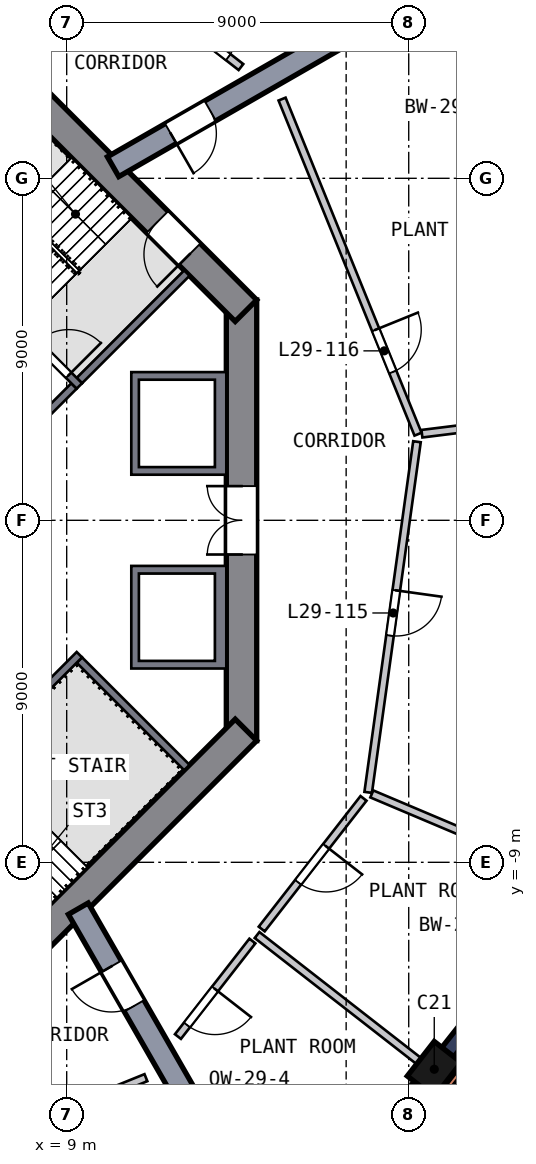
"""IFC4 building model, lengths in metres.
Left out: names, types, materials, properties, quantities, classifications, styles, units other than length and angle.
Written with IfcOpenShell. Run it as: python <this file> out.ifc"""

import sys

from ifc_helpers import new_model, si_unit, direction, frame, frame_2d, origin, origin_2d, place, context, subcontext, project, spatial, polyline, rectangle, outline, extrude, element, fill, save


model = new_model("IFC4")
c1 = context("Model", 3, precision=1e-05, world=origin(), true_north=direction((0.0, 1.0)))
c2 = subcontext(c1, "Body", "Model", "MODEL_VIEW")
j1 = project(units=[si_unit("LENGTHUNIT", "METRE"), si_unit("PLANEANGLEUNIT", "RADIAN")], contexts=[c1])
p1 = place(None, origin())
s1 = spatial("IfcSite", under=j1, at=p1, CompositionType="ELEMENT")
p2 = place(p1, origin())
s2 = spatial("IfcBuilding", under=s1, at=p2, CompositionType="ELEMENT")
p3 = place(p2, frame((0.0, 0.0, 122.0)))
s3 = spatial("IfcBuildingStorey", under=s2, at=p3, CompositionType="ELEMENT", Elevation=122.0)
p4 = place(p3, frame((18.624, -14.509, 0.0), z_axis=(0.040006427, 0.052241139, 0.997832826), x_axis=(0.613325681, 0.787084661, -0.065797763)))
e1 = element("IfcColumn", 1, at=p4, inside=s3, PredefinedType="COLUMN", context=c2, shape_type="SweptSolid", body=[
    extrude(rectangle(XDim=1.15, YDim=0.9, at=origin_2d()), origin(), (0.0, 0.0, 1.0), 4.51),
])
p5 = place(p3, frame((13.6, -5.799, 0.0), z_axis=(0.0, 0.0, 1.0), x_axis=(0.0, 1.0, 0.0)))
e2 = element("IfcWall", 2, at=p5, inside=s3, PredefinedType="SHEAR", context=c2, shape_type="SweptSolid", body=[
    extrude(rectangle(XDim=11.598, YDim=0.8, at=frame_2d((5.799, 0.0))), origin(), (0.0, 0.0, 1.0), 6.0),
])
p6 = place(p5, frame((4.899, 0.0, 0.0)))
e3 = element("IfcOpeningElement", 3, at=p6, cuts=e2, PredefinedType="OPENING", context=c2, shape_type="SweptSolid", body=[
    extrude(rectangle(XDim=1.8, YDim=2.1, at=frame_2d((0.9, 1.05))), frame((0.0, 0.41, 0.0), z_axis=(0.0, -1.0, 0.0), x_axis=(1.0, 0.0, 0.0)), (0.0, 0.0, 1.0), 0.82),
])
p7 = place(p3, frame((13.717, 5.516, 0.0), z_axis=(0.0, 0.0, 1.0), x_axis=(-0.707106781, 0.707106781, 0.0)))
e4 = element("IfcWall", 4, at=p7, inside=s3, PredefinedType="SHEAR", context=c2, shape_type="SweptSolid", body=[
    extrude(rectangle(XDim=11.598, YDim=0.8, at=frame_2d((5.799, 0.0))), origin(), (0.0, 0.0, 1.0), 6.0),
])
p8 = place(p7, frame((2.099, 0.0, 0.0)))
e5 = element("IfcOpeningElement", 5, at=p8, cuts=e4, PredefinedType="OPENING", context=c2, shape_type="SweptSolid", body=[
    extrude(rectangle(XDim=1.2, YDim=2.1, at=frame_2d((0.6, 1.05))), frame((0.0, 0.41, 0.0), z_axis=(0.0, -1.0, 0.0), x_axis=(1.0, 0.0, 0.0)), (0.0, 0.0, 1.0), 0.82),
])
p9 = place(p3, frame((5.516, -13.717, 0.0), z_axis=(0.0, 0.0, 1.0), x_axis=(0.707106781, 0.707106781, 0.0)))
e6 = element("IfcWall", 6, at=p9, inside=s3, PredefinedType="SHEAR", context=c2, shape_type="SweptSolid", body=[
    extrude(rectangle(XDim=11.598, YDim=0.8, at=frame_2d((5.799, 0.0))), origin(), (0.0, 0.0, 1.0), 6.0),
])
p10 = place(p9, frame((2.099, 0.0, 0.0)))
e7 = element("IfcOpeningElement", 7, at=p10, cuts=e6, PredefinedType="OPENING", context=c2, shape_type="SweptSolid", body=[
    extrude(rectangle(XDim=1.2, YDim=2.1, at=frame_2d((0.6, 1.05))), frame((0.0, 0.41, 0.0), z_axis=(0.0, -1.0, 0.0), x_axis=(1.0, 0.0, 0.0)), (0.0, 0.0, 1.0), 0.82),
])
p11 = place(p3, frame((15.012, -18.796, 0.0), z_axis=(0.0, 0.0, 1.0), x_axis=(0.644332147, 0.764745764, 0.0)))
e8 = element("IfcWall", 8, at=p11, inside=s3, PredefinedType="SHEAR", context=c2, shape_type="SweptSolid", body=[
    extrude(rectangle(XDim=5.014, YDim=0.4, at=frame_2d((2.507, 0.0))), origin(), (0.0, 0.0, 1.0), 4.5),
])
p12 = place(p3, frame((18.983, -14.055, 0.0), z_axis=(0.0, 0.0, 1.0), x_axis=(0.620299204, 0.784365284, 0.0)))
e9 = element("IfcWall", 9, at=p12, inside=s3, PredefinedType="SHEAR", context=c2, shape_type="SweptSolid", body=[
    extrude(rectangle(XDim=5.546, YDim=0.4, at=frame_2d((2.773, 0.0))), origin(), (0.0, 0.0, 1.0), 4.5),
])
p13 = place(p3, frame((9.305, -10.221, 0.0), z_axis=(0.0, 0.0, 1.0), x_axis=(0.498160963, -0.867084572, 0.0)))
e10 = element("IfcWall", 10, at=p13, inside=s3, PredefinedType="SHEAR", context=c2, shape_type="SweptSolid", body=[
    extrude(rectangle(XDim=10.058, YDim=0.6, at=frame_2d((5.029, 0.0))), origin(), (0.0, 0.0, 1.0), 4.5),
])
p14 = place(p13, frame((1.75, 0.0, 0.0)))
e11 = element("IfcOpeningElement", 11, at=p14, cuts=e10, PredefinedType="OPENING", context=c2, shape_type="SweptSolid", body=[
    extrude(rectangle(XDim=1.2, YDim=2.1, at=frame_2d((0.6, 1.05))), frame((0.0, 0.31, 0.0), z_axis=(0.0, -1.0, 0.0), x_axis=(1.0, 0.0, 0.0)), (0.0, 0.0, 1.0), 0.62),
])
p15 = place(p3, frame((10.221, 9.305, 0.0), z_axis=(0.0, 0.0, 1.0), x_axis=(0.867084572, 0.498160963, 0.0)))
e12 = element("IfcWall", 12, at=p15, inside=s3, PredefinedType="SHEAR", context=c2, shape_type="SweptSolid", body=[
    extrude(rectangle(XDim=10.058, YDim=0.6, at=frame_2d((5.029, 0.0))), origin(), (0.0, 0.0, 1.0), 4.5),
])
p16 = place(p15, frame((1.75, 0.0, 0.0)))
e13 = element("IfcOpeningElement", 13, at=p16, cuts=e12, PredefinedType="OPENING", context=c2, shape_type="SweptSolid", body=[
    extrude(rectangle(XDim=1.2, YDim=2.1, at=frame_2d((0.6, 1.05))), frame((0.0, 0.31, 0.0), z_axis=(0.0, -1.0, 0.0), x_axis=(1.0, 0.0, 0.0)), (0.0, 0.0, 1.0), 0.62),
])
p17 = place(p3, frame((15.083, -19.99, 0.0), z_axis=(0.0, 0.0, 1.0), x_axis=(0.614562211, 0.788868359, 0.0)))
e14 = element("IfcWall", 14, at=p17, inside=s3, PredefinedType="SOLIDWALL", context=c2, shape_type="SweptSolid", body=[
    extrude(rectangle(XDim=13.075, YDim=0.15, at=frame_2d((6.538, 0.0))), origin(), (0.0, 0.0, 1.0), 4.5),
])
p18 = place(p3, origin())
e15 = element("IfcWall", 15, at=p18, inside=s3, PredefinedType="SOLIDWALL", context=c2, shape_type="SweptSolid", body=[
    extrude(outline(polyline([(13.2, -1.2), (13.2, -3.9), (10.7, -3.9), (10.7, -1.2), (13.2, -1.2)]), holes=[polyline([(10.9, -3.7), (12.9, -3.7), (12.9, -1.4), (10.9, -1.4), (10.9, -3.7)])]), origin(), (0.0, 0.0, 1.0), 5.55),
])
p19 = place(p3, origin())
e16 = element("IfcWall", 16, at=p19, inside=s3, PredefinedType="SOLIDWALL", context=c2, shape_type="SweptSolid", body=[
    extrude(outline(polyline([(10.7, 3.9), (13.2, 3.9), (13.2, 1.2), (10.7, 1.2), (10.7, 3.9)]), holes=[polyline([(12.9, 1.4), (12.9, 3.7), (10.9, 3.7), (10.9, 1.4), (12.9, 1.4)])]), origin(), (0.0, 0.0, 1.0), 5.55),
])
p20 = place(p3, frame((3.535, 9.334, 0.0), z_axis=(0.0, 0.0, 1.0), x_axis=(0.707106781, -0.707106781, 0.0)))
e17 = element("IfcWall", 17, at=p20, inside=s3, PredefinedType="SOLIDWALL", context=c2, shape_type="SweptSolid", body=[
    extrude(rectangle(XDim=8.2, YDim=0.2, at=frame_2d((4.1, 0.0))), origin(), (0.0, 0.0, 1.0), 5.55),
])
p21 = place(p20, frame((6.6, 0.0, 0.0)))
e18 = element("IfcOpeningElement", 18, at=p21, cuts=e17, PredefinedType="OPENING", context=c2, shape_type="SweptSolid", body=[
    extrude(rectangle(XDim=1.2, YDim=2.1, at=frame_2d((0.6, 1.05))), frame((0.0, 0.11, 0.0), z_axis=(0.0, -1.0, 0.0), x_axis=(1.0, 0.0, 0.0)), (0.0, 0.0, 1.0), 0.22),
])
p22 = place(p3, frame((9.334, 3.677, 0.0), z_axis=(0.0, 0.0, 1.0), x_axis=(0.707106781, 0.707106781, 0.0)))
e19 = element("IfcWall", 19, at=p22, inside=s3, PredefinedType="SOLIDWALL", context=c2, shape_type="SweptSolid", body=[
    extrude(rectangle(XDim=4.0, YDim=0.2, at=frame_2d((2.0, 0.0))), origin(), (0.0, 0.0, 1.0), 5.55),
])
p23 = place(p3, frame((9.334, -3.535, 0.0), z_axis=(0.0, 0.0, 1.0), x_axis=(-0.707106781, -0.707106781, 0.0)))
e20 = element("IfcWall", 20, at=p23, inside=s3, PredefinedType="SOLIDWALL", context=c2, shape_type="SweptSolid", body=[
    extrude(rectangle(XDim=8.2, YDim=0.2, at=frame_2d((4.1, 0.0))), origin(), (0.0, 0.0, 1.0), 5.55),
])
p24 = place(p23, frame((6.6, 0.0, 0.0)))
e21 = element("IfcOpeningElement", 21, at=p24, cuts=e20, PredefinedType="OPENING", context=c2, shape_type="SweptSolid", body=[
    extrude(rectangle(XDim=1.2, YDim=2.1, at=frame_2d((0.6, 1.05))), frame((0.0, 0.11, 0.0), z_axis=(0.0, -1.0, 0.0), x_axis=(1.0, 0.0, 0.0)), (0.0, 0.0, 1.0), 0.22),
])
p25 = place(p3, frame((9.334, -3.677, 0.0), z_axis=(0.0, 0.0, 1.0), x_axis=(0.707106781, -0.707106781, 0.0)))
e22 = element("IfcWall", 22, at=p25, inside=s3, PredefinedType="SOLIDWALL", context=c2, shape_type="SweptSolid", body=[
    extrude(rectangle(XDim=4.0, YDim=0.2, at=frame_2d((2.0, 0.0))), origin(), (0.0, 0.0, 1.0), 5.55),
])
p26 = place(p3, frame((7.708, 2.051, 0.0), z_axis=(0.0, 0.0, 1.0), x_axis=(0.707106781, 0.707106781, 0.0)))
e23 = element("IfcWall", 23, at=p26, inside=s3, PredefinedType="SOLIDWALL", context=c2, shape_type="SweptSolid", body=[
    extrude(rectangle(XDim=2.1, YDim=0.2, at=frame_2d((1.05, 0.0))), origin(), (0.0, 0.0, 1.0), 5.55),
])
p27 = place(p3, frame((11.085, -14.667, 0.0), z_axis=(0.0, 0.0, 1.0), x_axis=(-0.926665674, -0.37588659, 0.0)))
e24 = element("IfcWall", 24, at=p27, inside=s3, PredefinedType="SOLIDWALL", context=c2, shape_type="SweptSolid", body=[
    extrude(rectangle(XDim=8.306, YDim=0.2, at=frame_2d((4.153, 0.0))), origin(), (0.0, 0.0, 1.0), 4.5),
])
p28 = place(p27, frame((6.55, 0.0, 0.0)))
e25 = element("IfcOpeningElement", 25, at=p28, cuts=e24, PredefinedType="OPENING", context=c2, shape_type="SweptSolid", body=[
    extrude(rectangle(XDim=1.2, YDim=2.1, at=frame_2d((0.6, 1.05))), frame((0.0, 0.11, 0.0), z_axis=(0.0, -1.0, 0.0), x_axis=(1.0, 0.0, 0.0)), (0.0, 0.0, 1.0), 0.22),
])
p29 = place(p3, frame((7.65, 16.552, 0.0), z_axis=(0.0, 0.0, 1.0), x_axis=(0.788857495, -0.614576157, 0.0)))
e26 = element("IfcWall", 26, at=p29, inside=s3, PredefinedType="SOLIDWALL", context=c2, shape_type="SweptSolid", body=[
    extrude(rectangle(XDim=7.524, YDim=0.2, at=frame_2d((3.762, 0.0))), origin(), (0.0, 0.0, 1.0), 4.5),
])
p30 = place(p29, frame((5.9, 0.0, 0.0)))
e27 = element("IfcOpeningElement", 27, at=p30, cuts=e26, PredefinedType="OPENING", context=c2, shape_type="SweptSolid", body=[
    extrude(rectangle(XDim=1.2, YDim=2.1, at=frame_2d((0.6, 1.05))), frame((0.0, 0.11, 0.0), z_axis=(0.0, -1.0, 0.0), x_axis=(1.0, 0.0, 0.0)), (0.0, 0.0, 1.0), 0.22),
])
p31 = place(p3, frame((13.886, -11.071, 0.0), z_axis=(0.0, 0.0, 1.0), x_axis=(-0.614571572, -0.788861067, 0.0)))
e28 = element("IfcWall", 28, at=p31, inside=s3, PredefinedType="SOLIDWALL", context=c2, shape_type="SweptSolid", body=[
    extrude(rectangle(XDim=3.187, YDim=0.2, at=frame_2d((1.593, 0.0))), origin(), (0.0, 0.0, 1.0), 4.5),
])
p32 = place(p31, frame((1.6, 0.0, 0.0)))
e29 = element("IfcOpeningElement", 29, at=p32, cuts=e28, PredefinedType="OPENING", context=c2, shape_type="SweptSolid", body=[
    extrude(rectangle(XDim=1.2, YDim=2.1, at=frame_2d((0.6, 1.05))), frame((0.0, 0.11, 0.0), z_axis=(0.0, -1.0, 0.0), x_axis=(1.0, 0.0, 0.0)), (0.0, 0.0, 1.0), 0.22),
])
p33 = place(p3, frame((16.81, -7.318, 0.0), z_axis=(0.0, 0.0, 1.0), x_axis=(-0.614553159, -0.788875411, 0.0)))
e30 = element("IfcWall", 30, at=p33, inside=s3, PredefinedType="SOLIDWALL", context=c2, shape_type="SweptSolid", body=[
    extrude(rectangle(XDim=4.358, YDim=0.2, at=frame_2d((2.179, 0.0))), origin(), (0.0, 0.0, 1.0), 4.5),
])
p34 = place(p33, frame((1.6, 0.0, 0.0)))
e31 = element("IfcOpeningElement", 31, at=p34, cuts=e30, PredefinedType="OPENING", context=c2, shape_type="SweptSolid", body=[
    extrude(rectangle(XDim=1.2, YDim=2.1, at=frame_2d((0.6, 1.05))), frame((0.0, 0.11, 0.0), z_axis=(0.0, -1.0, 0.0), x_axis=(1.0, 0.0, 0.0)), (0.0, 0.0, 1.0), 0.22),
])
p35 = place(p3, frame((14.667, 11.085, 0.0), z_axis=(0.0, 0.0, 1.0), x_axis=(0.375911138, -0.926655716, 0.0)))
e32 = element("IfcWall", 32, at=p35, inside=s3, PredefinedType="SOLIDWALL", context=c2, shape_type="SweptSolid", body=[
    extrude(rectangle(XDim=9.517, YDim=0.2, at=frame_2d((4.758, 0.0))), origin(), (0.0, 0.0, 1.0), 4.5),
])
p36 = place(p35, frame((6.55, 0.0, 0.0)))
e33 = element("IfcOpeningElement", 33, at=p36, cuts=e32, PredefinedType="OPENING", context=c2, shape_type="SweptSolid", body=[
    extrude(rectangle(XDim=1.2, YDim=2.1, at=frame_2d((0.6, 1.05))), frame((0.0, 0.11, 0.0), z_axis=(0.0, -1.0, 0.0), x_axis=(1.0, 0.0, 0.0)), (0.0, 0.0, 1.0), 0.22),
])
p37 = place(p3, frame((14.009, -10.914, 0.0), z_axis=(0.0, 0.0, 1.0), x_axis=(0.788875816, -0.614552639, 0.0)))
e34 = element("IfcWall", 34, at=p37, inside=s3, PredefinedType="SOLIDWALL", context=c2, shape_type="SweptSolid", body=[
    extrude(rectangle(XDim=6.35, YDim=0.2, at=frame_2d((3.175, 0.0))), origin(), (0.0, 0.0, 1.0), 4.5),
])
p38 = place(p3, frame((18.217, 2.068, 0.0), z_axis=(0.0, 0.0, 1.0), x_axis=(-0.137784751, -0.990462196, 0.0)))
e35 = element("IfcWall", 35, at=p38, inside=s3, PredefinedType="SOLIDWALL", context=c2, shape_type="SweptSolid", body=[
    extrude(rectangle(XDim=9.317, YDim=0.2, at=frame_2d((4.658, 0.0))), origin(), (0.0, 0.0, 1.0), 4.5),
])
p39 = place(p38, frame((3.95, 0.0, 0.0)))
e36 = element("IfcOpeningElement", 36, at=p39, cuts=e35, PredefinedType="OPENING", context=c2, shape_type="SweptSolid", body=[
    extrude(rectangle(XDim=1.2, YDim=2.1, at=frame_2d((0.6, 1.05))), frame((0.0, 0.11, 0.0), z_axis=(0.0, -1.0, 0.0), x_axis=(1.0, 0.0, 0.0)), (0.0, 0.0, 1.0), 0.22),
])
p40 = place(p3, frame((17.029, -7.2, 0.0), z_axis=(0.0, 0.0, 1.0), x_axis=(0.921045284, -0.389455497, 0.0)))
e37 = element("IfcWall", 37, at=p40, inside=s3, PredefinedType="SOLIDWALL", context=c2, shape_type="SweptSolid", body=[
    extrude(rectangle(XDim=6.476, YDim=0.2, at=frame_2d((3.238, 0.0))), origin(), (0.0, 0.0, 1.0), 4.5),
])
p41 = place(p3, frame((18.347, 2.279, 0.0), z_axis=(0.0, 0.0, 1.0), x_axis=(0.99237275, 0.123273374, 0.0)))
e38 = element("IfcWall", 38, at=p41, inside=s3, PredefinedType="SOLIDWALL", context=c2, shape_type="SweptSolid", body=[
    extrude(rectangle(XDim=5.526, YDim=0.2, at=frame_2d((2.763, 0.0))), origin(), (0.0, 0.0, 1.0), 4.5),
])
p42 = place(p21, origin())
e39 = element("IfcDoor", 39, at=p42, inside=s3, OperationType="SINGLE_SWING_RIGHT", PredefinedType="DOOR", context=c2, shape_type="SweptSolid", body=[
    extrude(rectangle(XDim=1.2, YDim=2.1, at=frame_2d((0.6, 1.05))), frame((0.0, 0.025, 0.0), z_axis=(0.0, -1.0, 0.0), x_axis=(1.0, 0.0, 0.0)), (0.0, 0.0, 1.0), 0.05),
])
fill(e18, e39)
p43 = place(p6, origin())
e40 = element("IfcDoor", 40, at=p43, inside=s3, OperationType="DOUBLE_DOOR_SINGLE_SWING", PredefinedType="DOOR", context=c2, shape_type="SweptSolid", body=[
    extrude(rectangle(XDim=1.8, YDim=2.1, at=frame_2d((0.9, 1.05))), frame((0.0, 0.025, 0.0), z_axis=(0.0, -1.0, 0.0), x_axis=(1.0, 0.0, 0.0)), (0.0, 0.0, 1.0), 0.05),
])
fill(e3, e40)
p44 = place(p8, origin())
e41 = element("IfcDoor", 41, at=p44, inside=s3, OperationType="SINGLE_SWING_LEFT", PredefinedType="DOOR", context=c2, shape_type="SweptSolid", body=[
    extrude(rectangle(XDim=1.2, YDim=2.1, at=frame_2d((0.6, 1.05))), frame((0.0, 0.025, 0.0), z_axis=(0.0, -1.0, 0.0), x_axis=(1.0, 0.0, 0.0)), (0.0, 0.0, 1.0), 0.05),
])
fill(e5, e41)
p45 = place(p14, origin())
e42 = element("IfcDoor", 42, at=p45, inside=s3, OperationType="SINGLE_SWING_LEFT", PredefinedType="DOOR", context=c2, shape_type="SweptSolid", body=[
    extrude(rectangle(XDim=1.2, YDim=2.1, at=frame_2d((0.6, 1.05))), frame((0.0, 0.025, 0.0), z_axis=(0.0, -1.0, 0.0), x_axis=(1.0, 0.0, 0.0)), (0.0, 0.0, 1.0), 0.05),
])
fill(e11, e42)
p46 = place(p16, origin())
e43 = element("IfcDoor", 43, at=p46, inside=s3, OperationType="SINGLE_SWING_LEFT", PredefinedType="DOOR", context=c2, shape_type="SweptSolid", body=[
    extrude(rectangle(XDim=1.2, YDim=2.1, at=frame_2d((0.6, 1.05))), frame((0.0, 0.025, 0.0), z_axis=(0.0, -1.0, 0.0), x_axis=(1.0, 0.0, 0.0)), (0.0, 0.0, 1.0), 0.05),
])
fill(e13, e43)
p47 = place(p32, origin())
e44 = element("IfcDoor", 44, at=p47, inside=s3, OperationType="SINGLE_SWING_LEFT", PredefinedType="DOOR", context=c2, shape_type="SweptSolid", body=[
    extrude(rectangle(XDim=1.2, YDim=2.1, at=frame_2d((0.6, 1.05))), frame((0.0, 0.025, 0.0), z_axis=(0.0, -1.0, 0.0), x_axis=(1.0, 0.0, 0.0)), (0.0, 0.0, 1.0), 0.05),
])
fill(e29, e44)
p48 = place(p34, origin())
e45 = element("IfcDoor", 45, at=p48, inside=s3, OperationType="SINGLE_SWING_LEFT", PredefinedType="DOOR", context=c2, shape_type="SweptSolid", body=[
    extrude(rectangle(XDim=1.2, YDim=2.1, at=frame_2d((0.6, 1.05))), frame((0.0, 0.025, 0.0), z_axis=(0.0, -1.0, 0.0), x_axis=(1.0, 0.0, 0.0)), (0.0, 0.0, 1.0), 0.05),
])
fill(e31, e45)
p49 = place(p39, origin())
e46 = element("IfcDoor", 46, at=p49, inside=s3, OperationType="SINGLE_SWING_LEFT", PredefinedType="DOOR", context=c2, shape_type="SweptSolid", body=[
    extrude(rectangle(XDim=1.2, YDim=2.1, at=frame_2d((0.6, 1.05))), frame((0.0, 0.025, 0.0), z_axis=(0.0, -1.0, 0.0), x_axis=(1.0, 0.0, 0.0)), (0.0, 0.0, 1.0), 0.05),
])
fill(e36, e46)
p50 = place(p36, origin())
e47 = element("IfcDoor", 47, at=p50, inside=s3, OperationType="SINGLE_SWING_LEFT", PredefinedType="DOOR", context=c2, shape_type="SweptSolid", body=[
    extrude(rectangle(XDim=1.2, YDim=2.1, at=frame_2d((0.6, 1.05))), frame((0.0, 0.025, 0.0), z_axis=(0.0, -1.0, 0.0), x_axis=(1.0, 0.0, 0.0)), (0.0, 0.0, 1.0), 0.05),
])
fill(e33, e47)
p51 = place(p30, origin())
e48 = element("IfcDoor", 48, at=p51, inside=s3, OperationType="SINGLE_SWING_LEFT", PredefinedType="DOOR", context=c2, shape_type="SweptSolid", body=[
    extrude(rectangle(XDim=1.2, YDim=2.1, at=frame_2d((0.6, 1.05))), frame((0.0, 0.025, 0.0), z_axis=(0.0, -1.0, 0.0), x_axis=(1.0, 0.0, 0.0)), (0.0, 0.0, 1.0), 0.05),
])
fill(e27, e48)
save(model, sys.argv[1])
